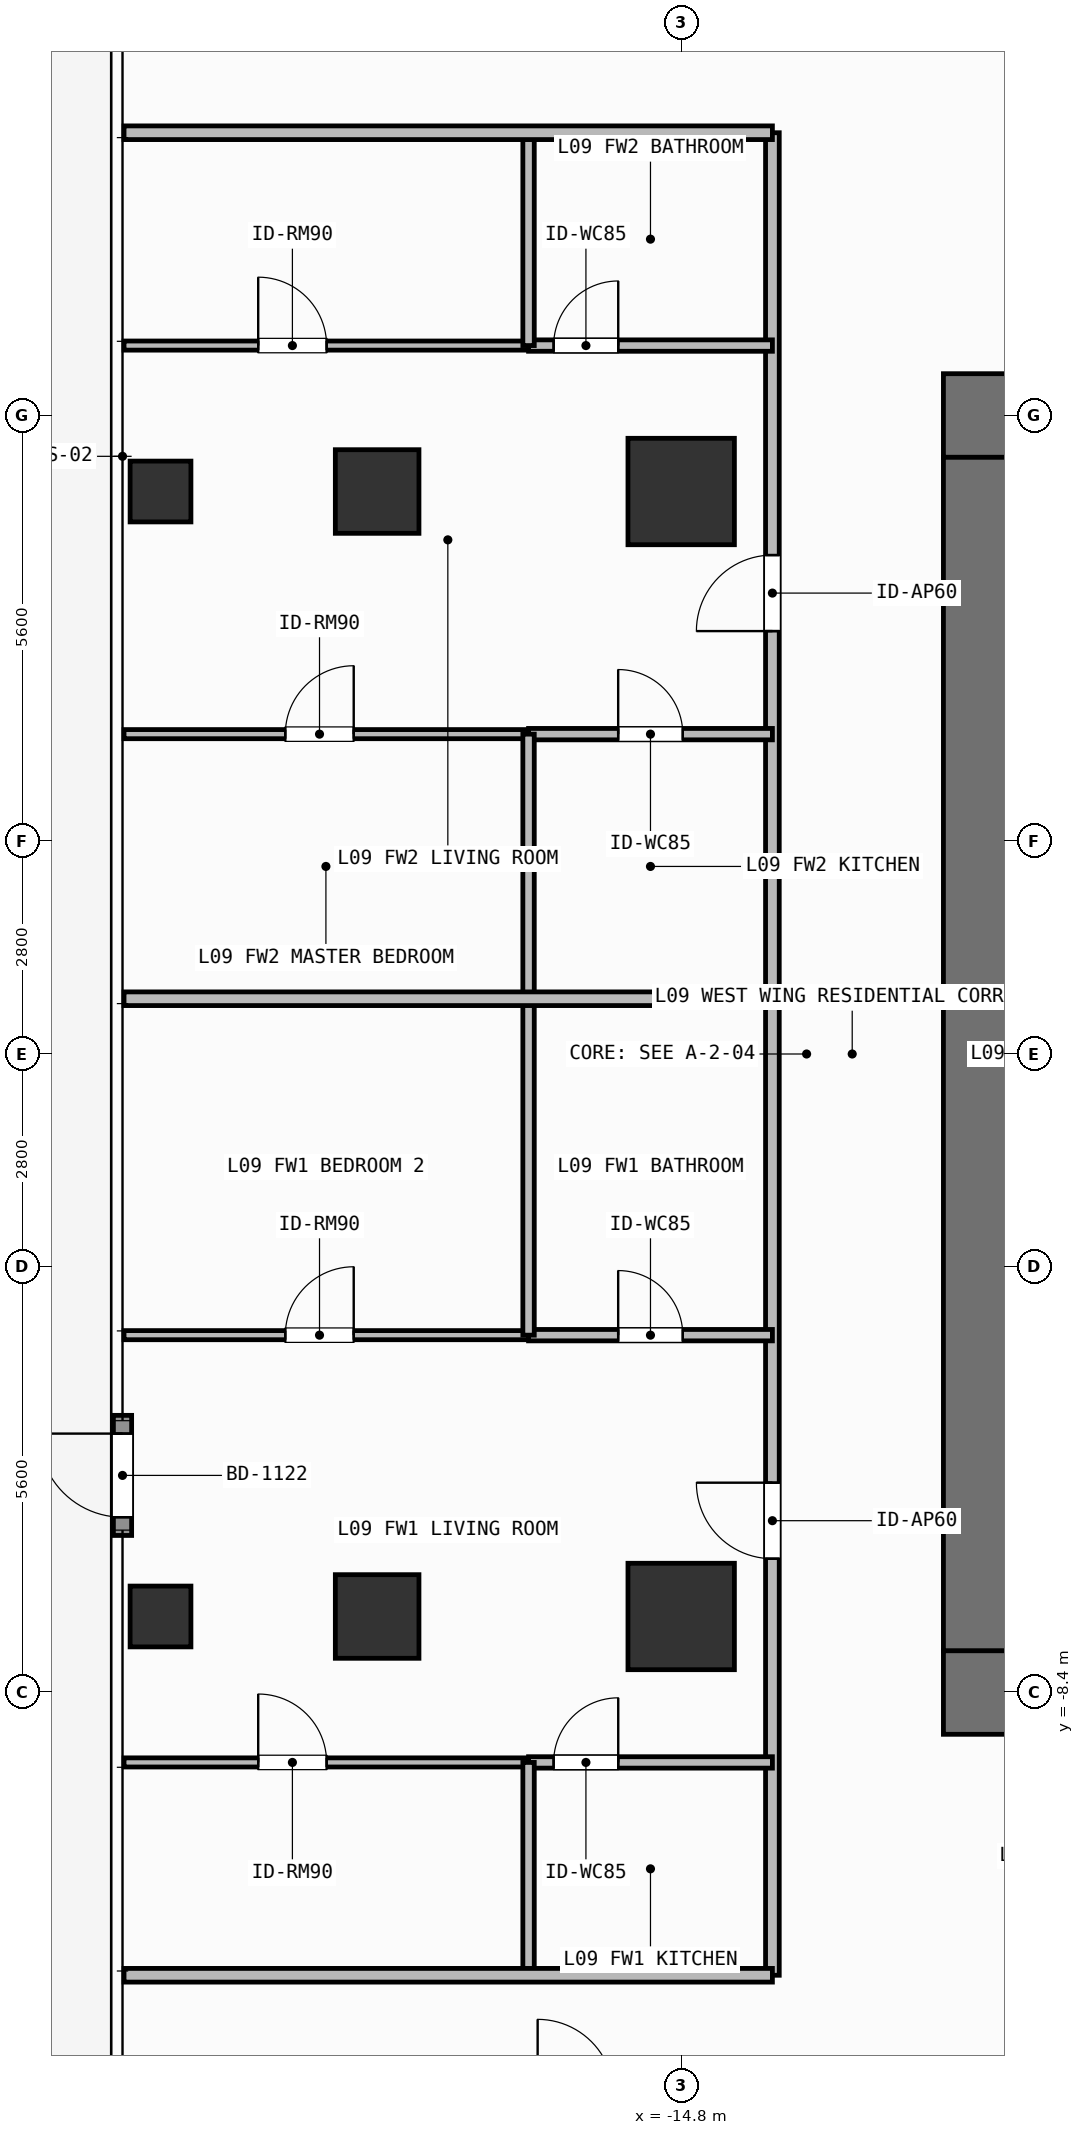
"""IFC4 building model, lengths in metres.
Left out: names, types, materials, properties, quantities, classifications, styles, units other than length and angle.
Written with IfcOpenShell. Run it as: python <this file> out.ifc"""

import sys

from ifc_helpers import new_model, si_unit, direction, frame, frame_2d, origin, origin_2d, place, context, subcontext, project, spatial, rectangle, hollow_rectangle, extrude, element, fill, save


model = new_model("IFC4")
c1 = context("Model", 3, precision=1e-05, world=origin(), true_north=direction((0.0, 1.0)))
c2 = subcontext(c1, "Body", "Model", "MODEL_VIEW")
j1 = project(units=[si_unit("LENGTHUNIT", "METRE"), si_unit("PLANEANGLEUNIT", "RADIAN")], contexts=[c1])
p1 = place(None, origin())
s1 = spatial("IfcSite", under=j1, at=p1, CompositionType="ELEMENT")
p2 = place(p1, origin())
s2 = spatial("IfcBuilding", under=s1, at=p2, CompositionType="ELEMENT")
p3 = place(p2, frame((0.0, 0.0, 34.5)))
s3 = spatial("IfcBuildingStorey", under=s2, at=p3, CompositionType="ELEMENT", Elevation=34.5)
for number, where, z_axis, x_axis in (
    (1, (-11.35, -8.4, 0.0), (0.0, 0.0, 1.0), (1.0, 0.0, 0.0)),
    (2, (-11.35, 8.4, 0.0), (0.0, 0.0, 1.0), (1.0, 0.0, 0.0)),
):
    element("IfcWall", number, at=place(p3, frame(where, z_axis=z_axis, x_axis=x_axis)), inside=s3, PredefinedType="SHEAR", context=c2, shape_type="SweptSolid", body=[
        extrude(rectangle(XDim=1.65, YDim=1.1, at=frame_2d((0.825, 0.0))), origin(), (0.0, 0.0, 1.0), 3.9),
    ])
p4 = place(p3, frame((-10.8, -7.85, 0.0), z_axis=(0.0, 0.0, 1.0), x_axis=(0.0, 1.0, 0.0)))
e3 = element("IfcWall", 3, at=p4, inside=s3, PredefinedType="SHEAR", context=c2, shape_type="SweptSolid", body=[
    extrude(rectangle(XDim=15.7, YDim=1.1, at=frame_2d((7.85, 0.0))), origin(), (0.0, 0.0, 1.0), 3.9),
])
for number, where, z_axis, x_axis in (
    (4, (-14.8, -7.4, 0.0), (0.0, 0.0, 1.0), (1.0, 0.0, 0.0)),
    (5, (-14.8, 7.4, 0.0), (0.0, 0.0, 1.0), (1.0, 0.0, 0.0)),
):
    element("IfcColumn", number, at=place(p3, frame(where, z_axis=z_axis, x_axis=x_axis)), inside=s3, PredefinedType="COLUMN", context=c2, shape_type="SweptSolid", body=[
        extrude(rectangle(XDim=1.4, YDim=1.4, at=origin_2d()), origin(), (0.0, 0.0, 1.0), 3.9),
    ])
for number, where, z_axis, x_axis in (
    (6, (-18.8, -7.4, 0.0), (0.0, 0.0, 1.0), (1.0, 0.0, 0.0)),
    (7, (-18.8, 7.4, 0.0), (0.0, 0.0, 1.0), (1.0, 0.0, 0.0)),
):
    element("IfcColumn", number, at=place(p3, frame(where, z_axis=z_axis, x_axis=x_axis)), inside=s3, PredefinedType="COLUMN", context=c2, shape_type="SweptSolid", body=[
        extrude(rectangle(XDim=1.1, YDim=1.1, at=origin_2d()), origin(), (0.0, 0.0, 1.0), 3.9),
    ])
for number, where, z_axis, x_axis in (
    (8, (-21.65, -7.4, 0.0), (0.0, 0.0, 1.0), (1.0, 0.0, 0.0)),
    (9, (-21.65, 7.4, 0.0), (0.0, 0.0, 1.0), (1.0, 0.0, 0.0)),
):
    element("IfcColumn", number, at=place(p3, frame(where, z_axis=z_axis, x_axis=x_axis)), inside=s3, PredefinedType="COLUMN", context=c2, shape_type="SweptSolid", body=[
        extrude(hollow_rectangle(XDim=0.8, YDim=0.8, WallThickness=0.036, at=origin_2d()), origin(), (0.0, 0.0, 1.0), 3.9),
    ])
p5 = place(p3, frame((-22.15, -6.334, 0.0), z_axis=(0.0, 0.0, 1.0), x_axis=(0.0, 1.0, 0.0)))
e10 = element("IfcWall", 10, at=p5, inside=s3, PredefinedType="SOLIDWALL", context=c2, shape_type="SweptSolid", body=[
    extrude(rectangle(XDim=1.58, YDim=0.24, at=frame_2d((0.79, 0.0))), origin(), (0.0, 0.0, 1.0), 3.68),
])
p6 = place(p5, frame((0.24, 0.0, 0.0)))
e11 = element("IfcOpeningElement", 11, at=p6, cuts=e10, PredefinedType="OPENING", context=c2, shape_type="SweptSolid", body=[
    extrude(rectangle(XDim=1.1, YDim=2.2, at=frame_2d((0.55, 1.1))), frame((0.0, 0.13, 0.0), z_axis=(0.0, -1.0, 0.0), x_axis=(1.0, 0.0, 0.0)), (0.0, 0.0, 1.0), 0.26),
])
p7 = place(p3, frame((-13.6, -12.12, 0.0), z_axis=(0.0, 0.0, 1.0), x_axis=(0.0, 1.0, 0.0)))
e12 = element("IfcWall", 12, at=p7, inside=s3, PredefinedType="PARTITIONING", context=c2, shape_type="SweptSolid", body=[
    extrude(rectangle(XDim=12.847, YDim=0.18, at=frame_2d((6.424, 0.0))), origin(), (0.0, 0.0, 1.0), 3.68),
])
p8 = place(p7, frame((5.48, 0.0, 0.0)))
e13 = element("IfcOpeningElement", 13, at=p8, cuts=e12, PredefinedType="OPENING", context=c2, shape_type="SweptSolid", body=[
    extrude(rectangle(XDim=1.0, YDim=2.2, at=frame_2d((0.5, 1.1))), frame((0.0, 0.1, 0.0), z_axis=(0.0, -1.0, 0.0), x_axis=(1.0, 0.0, 0.0)), (0.0, 0.0, 1.0), 0.2),
])
p9 = place(p3, frame((-16.808, -3.699, 0.0), z_axis=(0.0, 0.0, 1.0), x_axis=(1.0, 0.0, 0.0)))
e14 = element("IfcWall", 14, at=p9, inside=s3, PredefinedType="PARTITIONING", context=c2, shape_type="SweptSolid", body=[
    extrude(rectangle(XDim=3.208, YDim=0.15, at=frame_2d((1.604, 0.0))), origin(), (0.0, 0.0, 1.0), 3.68),
])
p10 = place(p9, frame((1.179, 0.0, 0.0)))
e15 = element("IfcOpeningElement", 15, at=p10, cuts=e14, PredefinedType="OPENING", context=c2, shape_type="SweptSolid", body=[
    extrude(rectangle(XDim=0.85, YDim=2.1, at=frame_2d((0.425, 1.05))), frame((0.0, 0.085, 0.0), z_axis=(0.0, -1.0, 0.0), x_axis=(1.0, 0.0, 0.0)), (0.0, 0.0, 1.0), 0.17),
])
p11 = place(p3, frame((-16.808, -9.32, 0.0), z_axis=(0.0, 0.0, 1.0), x_axis=(1.0, 0.0, 0.0)))
e16 = element("IfcWall", 16, at=p11, inside=s3, PredefinedType="PARTITIONING", context=c2, shape_type="SweptSolid", body=[
    extrude(rectangle(XDim=3.208, YDim=0.15, at=frame_2d((1.604, 0.0))), origin(), (0.0, 0.0, 1.0), 3.68),
])
p12 = place(p11, frame((0.33, 0.0, 0.0)))
e17 = element("IfcOpeningElement", 17, at=p12, cuts=e16, PredefinedType="OPENING", context=c2, shape_type="SweptSolid", body=[
    extrude(rectangle(XDim=0.85, YDim=2.1, at=frame_2d((0.425, 1.05))), frame((0.0, 0.085, 0.0), z_axis=(0.0, -1.0, 0.0), x_axis=(1.0, 0.0, 0.0)), (0.0, 0.0, 1.0), 0.17),
])
p13 = place(p3, frame((-22.13, -9.32, 0.0), z_axis=(0.0, 0.0, 1.0), x_axis=(1.0, 0.0, 0.0)))
e18 = element("IfcWall", 18, at=p13, inside=s3, PredefinedType="PARTITIONING", context=c2, shape_type="SweptSolid", body=[
    extrude(rectangle(XDim=5.322, YDim=0.12, at=frame_2d((2.661, 0.0))), origin(), (0.0, 0.0, 1.0), 3.68),
])
p14 = place(p13, frame((1.765, 0.0, 0.0)))
e19 = element("IfcOpeningElement", 19, at=p14, cuts=e18, PredefinedType="OPENING", context=c2, shape_type="SweptSolid", body=[
    extrude(rectangle(XDim=0.9, YDim=2.1, at=frame_2d((0.45, 1.05))), frame((0.0, 0.07, 0.0), z_axis=(0.0, -1.0, 0.0), x_axis=(1.0, 0.0, 0.0)), (0.0, 0.0, 1.0), 0.14),
])
p15 = place(p3, frame((-22.13, -3.699, 0.0), z_axis=(0.0, 0.0, 1.0), x_axis=(1.0, 0.0, 0.0)))
e20 = element("IfcWall", 20, at=p15, inside=s3, PredefinedType="PARTITIONING", context=c2, shape_type="SweptSolid", body=[
    extrude(rectangle(XDim=5.322, YDim=0.12, at=frame_2d((2.661, 0.0))), origin(), (0.0, 0.0, 1.0), 3.68),
])
p16 = place(p15, frame((2.122, 0.0, 0.0)))
e21 = element("IfcOpeningElement", 21, at=p16, cuts=e20, PredefinedType="OPENING", context=c2, shape_type="SweptSolid", body=[
    extrude(rectangle(XDim=0.9, YDim=2.1, at=frame_2d((0.45, 1.05))), frame((0.0, 0.07, 0.0), z_axis=(0.0, -1.0, 0.0), x_axis=(1.0, 0.0, 0.0)), (0.0, 0.0, 1.0), 0.14),
])
p17 = place(p3, frame((-13.6, 0.727, 0.0), z_axis=(0.0, 0.0, 1.0), x_axis=(0.0, 1.0, 0.0)))
e22 = element("IfcWall", 22, at=p17, inside=s3, PredefinedType="PARTITIONING", context=c2, shape_type="SweptSolid", body=[
    extrude(rectangle(XDim=11.393, YDim=0.18, at=frame_2d((5.697, 0.0))), origin(), (0.0, 0.0, 1.0), 3.68),
])
p18 = place(p17, frame((4.837, 0.0, 0.0)))
e23 = element("IfcOpeningElement", 23, at=p18, cuts=e22, PredefinedType="OPENING", context=c2, shape_type="SweptSolid", body=[
    extrude(rectangle(XDim=1.0, YDim=2.2, at=frame_2d((0.5, 1.1))), frame((0.0, 0.1, 0.0), z_axis=(0.0, -1.0, 0.0), x_axis=(1.0, 0.0, 0.0)), (0.0, 0.0, 1.0), 0.2),
])
p19 = place(p3, frame((-16.808, 9.32, 0.0), z_axis=(0.0, 0.0, 1.0), x_axis=(1.0, 0.0, 0.0)))
e24 = element("IfcWall", 24, at=p19, inside=s3, PredefinedType="PARTITIONING", context=c2, shape_type="SweptSolid", body=[
    extrude(rectangle(XDim=3.208, YDim=0.15, at=frame_2d((1.604, 0.0))), origin(), (0.0, 0.0, 1.0), 3.68),
])
p20 = place(p19, frame((0.33, 0.0, 0.0)))
e25 = element("IfcOpeningElement", 25, at=p20, cuts=e24, PredefinedType="OPENING", context=c2, shape_type="SweptSolid", body=[
    extrude(rectangle(XDim=0.85, YDim=2.1, at=frame_2d((0.425, 1.05))), frame((0.0, 0.085, 0.0), z_axis=(0.0, -1.0, 0.0), x_axis=(1.0, 0.0, 0.0)), (0.0, 0.0, 1.0), 0.17),
])
p21 = place(p3, frame((-16.808, 4.208, 0.0), z_axis=(0.0, 0.0, 1.0), x_axis=(1.0, 0.0, 0.0)))
e26 = element("IfcWall", 26, at=p21, inside=s3, PredefinedType="PARTITIONING", context=c2, shape_type="SweptSolid", body=[
    extrude(rectangle(XDim=3.208, YDim=0.15, at=frame_2d((1.604, 0.0))), origin(), (0.0, 0.0, 1.0), 3.68),
])
p22 = place(p21, frame((1.179, 0.0, 0.0)))
e27 = element("IfcOpeningElement", 27, at=p22, cuts=e26, PredefinedType="OPENING", context=c2, shape_type="SweptSolid", body=[
    extrude(rectangle(XDim=0.85, YDim=2.1, at=frame_2d((0.425, 1.05))), frame((0.0, 0.085, 0.0), z_axis=(0.0, -1.0, 0.0), x_axis=(1.0, 0.0, 0.0)), (0.0, 0.0, 1.0), 0.17),
])
p23 = place(p3, frame((-22.13, 4.208, 0.0), z_axis=(0.0, 0.0, 1.0), x_axis=(1.0, 0.0, 0.0)))
e28 = element("IfcWall", 28, at=p23, inside=s3, PredefinedType="PARTITIONING", context=c2, shape_type="SweptSolid", body=[
    extrude(rectangle(XDim=5.322, YDim=0.12, at=frame_2d((2.661, 0.0))), origin(), (0.0, 0.0, 1.0), 3.68),
])
p24 = place(p23, frame((2.122, 0.0, 0.0)))
e29 = element("IfcOpeningElement", 29, at=p24, cuts=e28, PredefinedType="OPENING", context=c2, shape_type="SweptSolid", body=[
    extrude(rectangle(XDim=0.9, YDim=2.1, at=frame_2d((0.45, 1.05))), frame((0.0, 0.07, 0.0), z_axis=(0.0, -1.0, 0.0), x_axis=(1.0, 0.0, 0.0)), (0.0, 0.0, 1.0), 0.14),
])
p25 = place(p3, frame((-22.13, 9.32, 0.0), z_axis=(0.0, 0.0, 1.0), x_axis=(1.0, 0.0, 0.0)))
e30 = element("IfcWall", 30, at=p25, inside=s3, PredefinedType="PARTITIONING", context=c2, shape_type="SweptSolid", body=[
    extrude(rectangle(XDim=5.322, YDim=0.12, at=frame_2d((2.661, 0.0))), origin(), (0.0, 0.0, 1.0), 3.68),
])
p26 = place(p25, frame((1.765, 0.0, 0.0)))
e31 = element("IfcOpeningElement", 31, at=p26, cuts=e30, PredefinedType="OPENING", context=c2, shape_type="SweptSolid", body=[
    extrude(rectangle(XDim=0.9, YDim=2.1, at=frame_2d((0.45, 1.05))), frame((0.0, 0.07, 0.0), z_axis=(0.0, -1.0, 0.0), x_axis=(1.0, 0.0, 0.0)), (0.0, 0.0, 1.0), 0.14),
])
p27 = place(p3, frame((-16.808, -12.12, 0.0), z_axis=(0.0, 0.0, 1.0), x_axis=(0.0, 1.0, 0.0)))
e32 = element("IfcWall", 32, at=p27, inside=s3, PredefinedType="PARTITIONING", context=c2, shape_type="SweptSolid", body=[
    extrude(rectangle(XDim=2.8, YDim=0.15, at=frame_2d((1.4, 0.0))), origin(), (0.0, 0.0, 1.0), 3.68),
])
p28 = place(p3, frame((-16.808, -3.699, 0.0), z_axis=(0.0, 0.0, 1.0), x_axis=(0.0, 1.0, 0.0)))
e33 = element("IfcWall", 33, at=p28, inside=s3, PredefinedType="PARTITIONING", context=c2, shape_type="SweptSolid", body=[
    extrude(rectangle(XDim=4.426, YDim=0.15, at=frame_2d((2.213, 0.0))), origin(), (0.0, 0.0, 1.0), 3.68),
])
p29 = place(p3, frame((-16.808, 0.727, 0.0), z_axis=(0.0, 0.0, 1.0), x_axis=(0.0, 1.0, 0.0)))
e34 = element("IfcWall", 34, at=p29, inside=s3, PredefinedType="PARTITIONING", context=c2, shape_type="SweptSolid", body=[
    extrude(rectangle(XDim=3.481, YDim=0.15, at=frame_2d((1.74, 0.0))), origin(), (0.0, 0.0, 1.0), 3.68),
])
p30 = place(p3, frame((-16.808, 9.32, 0.0), z_axis=(0.0, 0.0, 1.0), x_axis=(0.0, 1.0, 0.0)))
e35 = element("IfcWall", 35, at=p30, inside=s3, PredefinedType="PARTITIONING", context=c2, shape_type="SweptSolid", body=[
    extrude(rectangle(XDim=2.8, YDim=0.15, at=frame_2d((1.4, 0.0))), origin(), (0.0, 0.0, 1.0), 3.68),
])
for number, where, z_axis, x_axis in (
    (36, (-22.13, 0.727, 0.0), (0.0, 0.0, 1.0), (1.0, 0.0, 0.0)),
    (37, (-22.13, -12.12, 0.0), (0.0, 0.0, 1.0), (1.0, 0.0, 0.0)),
    (38, (-22.13, 12.12, 0.0), (0.0, 0.0, 1.0), (1.0, 0.0, 0.0)),
):
    element("IfcWall", number, at=place(p3, frame(where, z_axis=z_axis, x_axis=x_axis)), inside=s3, PredefinedType="PARTITIONING", context=c2, shape_type="SweptSolid", body=[
        extrude(rectangle(XDim=8.53, YDim=0.18, at=frame_2d((4.265, 0.0))), origin(), (0.0, 0.0, 1.0), 3.68),
    ])
p31 = place(p6, origin())
e39 = element("IfcDoor", 39, at=p31, inside=s3, OperationType="SINGLE_SWING_RIGHT", PredefinedType="DOOR", context=c2, shape_type="SweptSolid", body=[
    extrude(rectangle(XDim=1.1, YDim=2.2, at=frame_2d((0.55, 1.1))), frame((0.0, 0.025, 0.0), z_axis=(0.0, -1.0, 0.0), x_axis=(1.0, 0.0, 0.0)), (0.0, 0.0, 1.0), 0.05),
])
fill(e11, e39)
p32 = place(p8, origin())
e40 = element("IfcDoor", 40, at=p32, inside=s3, OperationType="SINGLE_SWING_RIGHT", PredefinedType="DOOR", context=c2, shape_type="SweptSolid", body=[
    extrude(rectangle(XDim=1.0, YDim=2.2, at=frame_2d((0.5, 1.1))), frame((0.0, 0.025, 0.0), z_axis=(0.0, -1.0, 0.0), x_axis=(1.0, 0.0, 0.0)), (0.0, 0.0, 1.0), 0.05),
])
fill(e13, e40)
p33 = place(p10, origin())
e41 = element("IfcDoor", 41, at=p33, inside=s3, OperationType="SINGLE_SWING_LEFT", PredefinedType="DOOR", context=c2, shape_type="SweptSolid", body=[
    extrude(rectangle(XDim=0.85, YDim=2.1, at=frame_2d((0.425, 1.05))), frame((0.0, 0.025, 0.0), z_axis=(0.0, -1.0, 0.0), x_axis=(1.0, 0.0, 0.0)), (0.0, 0.0, 1.0), 0.05),
])
fill(e15, e41)
p34 = place(p12, origin())
e42 = element("IfcDoor", 42, at=p34, inside=s3, OperationType="SINGLE_SWING_RIGHT", PredefinedType="DOOR", context=c2, shape_type="SweptSolid", body=[
    extrude(rectangle(XDim=0.85, YDim=2.1, at=frame_2d((0.425, 1.05))), frame((0.0, 0.025, 0.0), z_axis=(0.0, -1.0, 0.0), x_axis=(1.0, 0.0, 0.0)), (0.0, 0.0, 1.0), 0.05),
])
fill(e17, e42)
p35 = place(p14, origin())
e43 = element("IfcDoor", 43, at=p35, inside=s3, OperationType="SINGLE_SWING_LEFT", PredefinedType="DOOR", context=c2, shape_type="SweptSolid", body=[
    extrude(rectangle(XDim=0.9, YDim=2.1, at=frame_2d((0.45, 1.05))), frame((0.0, 0.025, 0.0), z_axis=(0.0, -1.0, 0.0), x_axis=(1.0, 0.0, 0.0)), (0.0, 0.0, 1.0), 0.05),
])
fill(e19, e43)
p36 = place(p16, origin())
e44 = element("IfcDoor", 44, at=p36, inside=s3, OperationType="SINGLE_SWING_RIGHT", PredefinedType="DOOR", context=c2, shape_type="SweptSolid", body=[
    extrude(rectangle(XDim=0.9, YDim=2.1, at=frame_2d((0.45, 1.05))), frame((0.0, 0.025, 0.0), z_axis=(0.0, -1.0, 0.0), x_axis=(1.0, 0.0, 0.0)), (0.0, 0.0, 1.0), 0.05),
])
fill(e21, e44)
p37 = place(p18, origin())
e45 = element("IfcDoor", 45, at=p37, inside=s3, OperationType="SINGLE_SWING_LEFT", PredefinedType="DOOR", context=c2, shape_type="SweptSolid", body=[
    extrude(rectangle(XDim=1.0, YDim=2.2, at=frame_2d((0.5, 1.1))), frame((0.0, 0.025, 0.0), z_axis=(0.0, -1.0, 0.0), x_axis=(1.0, 0.0, 0.0)), (0.0, 0.0, 1.0), 0.05),
])
fill(e23, e45)
p38 = place(p20, origin())
e46 = element("IfcDoor", 46, at=p38, inside=s3, OperationType="SINGLE_SWING_RIGHT", PredefinedType="DOOR", context=c2, shape_type="SweptSolid", body=[
    extrude(rectangle(XDim=0.85, YDim=2.1, at=frame_2d((0.425, 1.05))), frame((0.0, 0.025, 0.0), z_axis=(0.0, -1.0, 0.0), x_axis=(1.0, 0.0, 0.0)), (0.0, 0.0, 1.0), 0.05),
])
fill(e25, e46)
p39 = place(p22, origin())
e47 = element("IfcDoor", 47, at=p39, inside=s3, OperationType="SINGLE_SWING_LEFT", PredefinedType="DOOR", context=c2, shape_type="SweptSolid", body=[
    extrude(rectangle(XDim=0.85, YDim=2.1, at=frame_2d((0.425, 1.05))), frame((0.0, 0.025, 0.0), z_axis=(0.0, -1.0, 0.0), x_axis=(1.0, 0.0, 0.0)), (0.0, 0.0, 1.0), 0.05),
])
fill(e27, e47)
p40 = place(p24, origin())
e48 = element("IfcDoor", 48, at=p40, inside=s3, OperationType="SINGLE_SWING_RIGHT", PredefinedType="DOOR", context=c2, shape_type="SweptSolid", body=[
    extrude(rectangle(XDim=0.9, YDim=2.1, at=frame_2d((0.45, 1.05))), frame((0.0, 0.025, 0.0), z_axis=(0.0, -1.0, 0.0), x_axis=(1.0, 0.0, 0.0)), (0.0, 0.0, 1.0), 0.05),
])
fill(e29, e48)
p41 = place(p26, origin())
e49 = element("IfcDoor", 49, at=p41, inside=s3, OperationType="SINGLE_SWING_LEFT", PredefinedType="DOOR", context=c2, shape_type="SweptSolid", body=[
    extrude(rectangle(XDim=0.9, YDim=2.1, at=frame_2d((0.45, 1.05))), frame((0.0, 0.025, 0.0), z_axis=(0.0, -1.0, 0.0), x_axis=(1.0, 0.0, 0.0)), (0.0, 0.0, 1.0), 0.05),
])
fill(e31, e49)
save(model, sys.argv[1])
